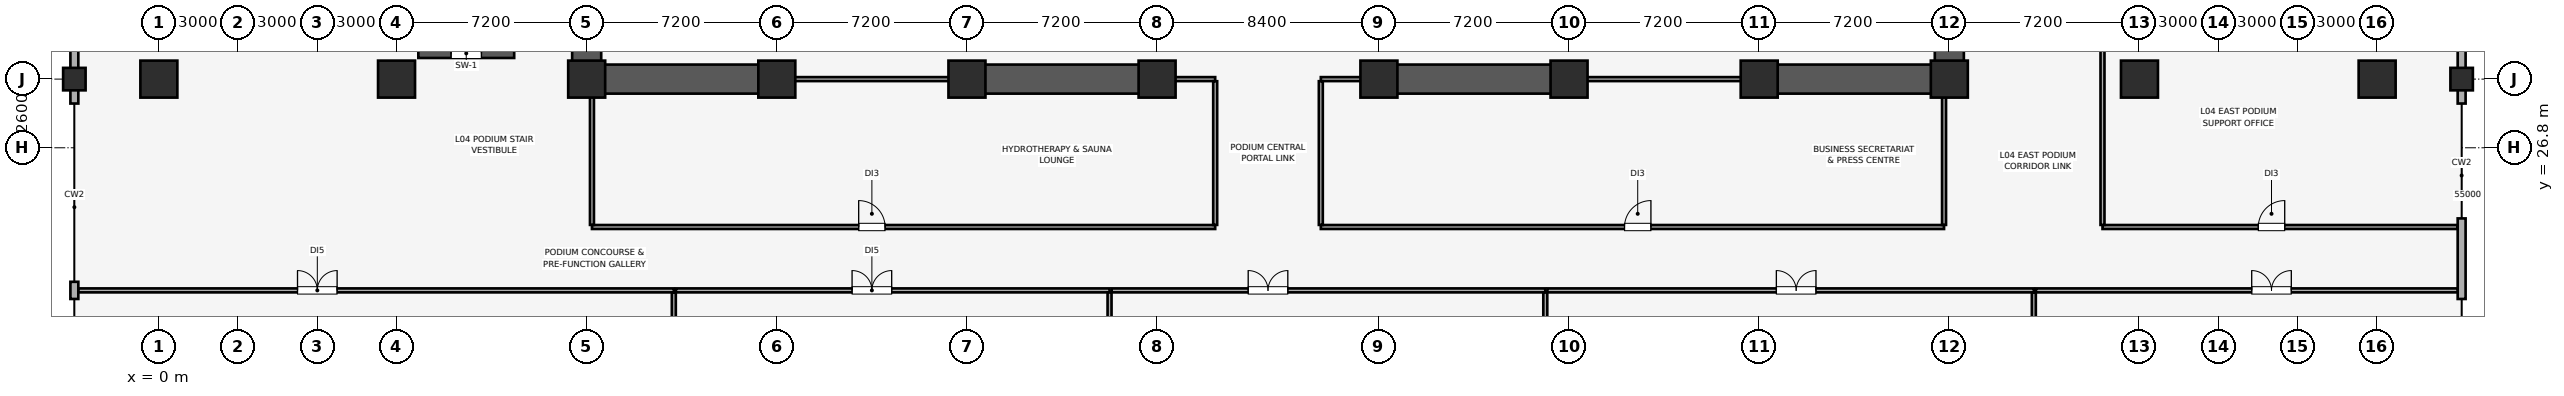
"""IFC4 building model, lengths in metres.
Left out: names, types, materials, properties, quantities, classifications, styles, units other than length and angle.
Written with IfcOpenShell. Run it as: python <this file> out.ifc"""

import sys

from ifc_helpers import new_model, si_unit, direction, frame, frame_2d, origin, origin_2d, place, context, subcontext, project, spatial, rectangle, extrude, element, fill, save


model = new_model("IFC4")
c1 = context("Model", 3, precision=1e-05, world=origin(), true_north=direction((0.0, 1.0)))
c2 = subcontext(c1, "Body", "Model", "MODEL_VIEW")
j1 = project(units=[si_unit("LENGTHUNIT", "METRE"), si_unit("PLANEANGLEUNIT", "RADIAN")], contexts=[c1])
p1 = place(None, origin())
s1 = spatial("IfcSite", under=j1, at=p1, CompositionType="ELEMENT")
p2 = place(p1, origin())
s2 = spatial("IfcBuilding", under=s1, at=p2, CompositionType="ELEMENT")
p3 = place(p2, frame((0.0, 0.0, 26.0)))
s3 = spatial("IfcBuildingStorey", under=s2, at=p3, CompositionType="ELEMENT", Elevation=26.0)
for number, where, z_axis, x_axis in (
    (1, (-3.2, 29.4, 0.0), (0.0, 0.0, 1.0), (1.0, 0.0, 0.0)),
    (2, (87.2, 29.4, 0.0), (0.0, 0.0, 1.0), (1.0, 0.0, 0.0)),
):
    element("IfcColumn", number, at=place(p3, frame(where, z_axis=z_axis, x_axis=x_axis)), inside=s3, PredefinedType="COLUMN", context=c2, shape_type="SweptSolid", body=[
        extrude(rectangle(XDim=0.85, YDim=0.85, at=origin_2d()), origin(), (0.0, 0.0, 1.0), 5.16),
    ])
for number, where, z_axis, x_axis in (
    (3, (9.0, 29.4, 0.0), (0.0, 0.0, 1.0), (1.0, 0.0, 0.0)),
    (4, (16.2, 29.4, 0.0), (0.0, 0.0, 1.0), (1.0, 0.0, 0.0)),
    (5, (23.4, 29.4, 0.0), (0.0, 0.0, 1.0), (1.0, 0.0, 0.0)),
    (6, (30.6, 29.4, 0.0), (0.0, 0.0, 1.0), (1.0, 0.0, 0.0)),
    (7, (37.8, 29.4, 0.0), (0.0, 0.0, 1.0), (1.0, 0.0, 0.0)),
    (8, (46.2, 29.4, 0.0), (0.0, 0.0, 1.0), (1.0, 0.0, 0.0)),
    (9, (53.4, 29.4, 0.0), (0.0, 0.0, 1.0), (1.0, 0.0, 0.0)),
    (10, (60.6, 29.4, 0.0), (0.0, 0.0, 1.0), (1.0, 0.0, 0.0)),
    (11, (67.8, 29.4, 0.0), (0.0, 0.0, 1.0), (1.0, 0.0, 0.0)),
    (12, (75.0, 29.4, 0.0), (0.0, 0.0, 1.0), (1.0, 0.0, 0.0)),
    (13, (0.0, 29.4, 0.0), (0.0, 0.0, 1.0), (1.0, 0.0, 0.0)),
    (14, (84.0, 29.4, 0.0), (0.0, 0.0, 1.0), (1.0, 0.0, 0.0)),
):
    element("IfcColumn", number, at=place(p3, frame(where, z_axis=z_axis, x_axis=x_axis)), inside=s3, PredefinedType="COLUMN", context=c2, shape_type="SweptSolid", body=[
        extrude(rectangle(XDim=1.4, YDim=1.4, at=origin_2d()), origin(), (0.0, 0.0, 1.0), 5.16),
    ])
p4 = place(p3, frame((87.2, 21.075, 0.0), z_axis=(0.0, 0.0, 1.0), x_axis=(0.0, 1.0, 0.0)))
e15 = element("IfcWall", 15, at=p4, inside=s3, PredefinedType="SOLIDWALL", context=c2, shape_type="SweptSolid", body=[
    extrude(rectangle(XDim=3.05, YDim=0.3, at=frame_2d((1.525, 0.0))), origin(), (0.0, 0.0, 1.0), 5.12),
])
p5 = place(p3, frame((87.2, 28.475, 0.0), z_axis=(0.0, 0.0, 1.0), x_axis=(0.0, 1.0, 0.0)))
e16 = element("IfcWall", 16, at=p5, inside=s3, PredefinedType="SOLIDWALL", context=c2, shape_type="SweptSolid", body=[
    extrude(rectangle(XDim=20.425, YDim=0.3, at=frame_2d((10.212, 0.0))), origin(), (0.0, 0.0, 1.0), 5.12),
])
p6 = place(p5, frame((4.525, 0.0, 0.85)))
e17 = element("IfcOpeningElement", 17, at=p6, cuts=e16, PredefinedType="OPENING", context=c2, shape_type="SweptSolid", body=[
    extrude(rectangle(XDim=3.8, YDim=2.2, at=frame_2d((1.9, 1.1))), frame((0.0, 0.16, 0.0), z_axis=(0.0, -1.0, 0.0), x_axis=(1.0, 0.0, 0.0)), (0.0, 0.0, 1.0), 0.32),
])
p7 = place(p5, frame((12.425, 0.0, 0.85)))
e18 = element("IfcOpeningElement", 18, at=p7, cuts=e16, PredefinedType="OPENING", context=c2, shape_type="SweptSolid", body=[
    extrude(rectangle(XDim=3.8, YDim=2.2, at=frame_2d((1.9, 1.1))), frame((0.0, 0.16, 0.0), z_axis=(0.0, -1.0, 0.0), x_axis=(1.0, 0.0, 0.0)), (0.0, 0.0, 1.0), 0.32),
])
p8 = place(p3, frame((-3.2, 48.9, 0.0), z_axis=(0.0, 0.0, 1.0), x_axis=(0.0, -1.0, 0.0)))
e19 = element("IfcWall", 19, at=p8, inside=s3, PredefinedType="SOLIDWALL", context=c2, shape_type="SweptSolid", body=[
    extrude(rectangle(XDim=20.425, YDim=0.3, at=frame_2d((10.212, 0.0))), origin(), (0.0, 0.0, 1.0), 5.12),
])
p9 = place(p8, frame((12.5, 0.0, 0.85)))
e20 = element("IfcOpeningElement", 20, at=p9, cuts=e19, PredefinedType="OPENING", context=c2, shape_type="SweptSolid", body=[
    extrude(rectangle(XDim=3.8, YDim=2.2, at=frame_2d((1.9, 1.1))), frame((0.0, 0.16, 0.0), z_axis=(0.0, -1.0, 0.0), x_axis=(1.0, 0.0, 0.0)), (0.0, 0.0, 1.0), 0.32),
])
p10 = place(p8, frame((4.2, 0.0, 0.85)))
e21 = element("IfcOpeningElement", 21, at=p10, cuts=e19, PredefinedType="OPENING", context=c2, shape_type="SweptSolid", body=[
    extrude(rectangle(XDim=3.8, YDim=2.2, at=frame_2d((1.9, 1.1))), frame((0.0, 0.16, 0.0), z_axis=(0.0, -1.0, 0.0), x_axis=(1.0, 0.0, 0.0)), (0.0, 0.0, 1.0), 0.32),
])
p11 = place(p3, frame((-3.2, 21.725, 0.0), z_axis=(0.0, 0.0, 1.0), x_axis=(0.0, -1.0, 0.0)))
e22 = element("IfcWall", 22, at=p11, inside=s3, PredefinedType="SOLIDWALL", context=c2, shape_type="SweptSolid", body=[
    extrude(rectangle(XDim=0.65, YDim=0.3, at=frame_2d((0.325, 0.0))), origin(), (0.0, 0.0, 1.0), 5.12),
])
for number, where, z_axis, x_axis in (
    (23, (16.2, 29.4, 0.0), (0.0, 0.0, 1.0), (0.0, 1.0, 0.0)),
    (24, (67.8, 29.4, 0.0), (0.0, 0.0, 1.0), (0.0, 1.0, 0.0)),
):
    element("IfcWall", number, at=place(p3, frame(where, z_axis=z_axis, x_axis=x_axis)), inside=s3, PredefinedType="SHEAR", context=c2, shape_type="SweptSolid", body=[
        extrude(rectangle(XDim=19.2, YDim=1.1, at=frame_2d((9.6, 0.0))), origin(), (0.0, 0.0, 1.0), 5.12),
    ])
p12 = place(p3, frame((16.755, 29.4, 0.0), z_axis=(0.0, 0.0, 1.0), x_axis=(1.0, 0.0, 0.0)))
e25 = element("IfcWall", 25, at=p12, inside=s3, PredefinedType="SHEAR", context=c2, shape_type="SweptSolid", body=[
    extrude(rectangle(XDim=6.845, YDim=1.1, at=frame_2d((3.423, 0.0))), origin(), (0.0, 0.0, 1.0), 5.12),
])
for number, where, z_axis, x_axis in (
    (26, (30.4, 29.4, 0.0), (0.0, 0.0, 1.0), (1.0, 0.0, 0.0)),
    (27, (46.0, 29.4, 0.0), (0.0, 0.0, 1.0), (1.0, 0.0, 0.0)),
):
    element("IfcWall", number, at=place(p3, frame(where, z_axis=z_axis, x_axis=x_axis)), inside=s3, PredefinedType="SHEAR", context=c2, shape_type="SweptSolid", body=[
        extrude(rectangle(XDim=7.6, YDim=1.1, at=frame_2d((3.8, 0.0))), origin(), (0.0, 0.0, 1.0), 5.12),
    ])
p13 = place(p3, frame((60.4, 29.4, 0.0), z_axis=(0.0, 0.0, 1.0), x_axis=(1.0, 0.0, 0.0)))
e28 = element("IfcWall", 28, at=p13, inside=s3, PredefinedType="SHEAR", context=c2, shape_type="SweptSolid", body=[
    extrude(rectangle(XDim=6.845, YDim=1.1, at=frame_2d((3.423, 0.0))), origin(), (0.0, 0.0, 1.0), 5.12),
])
p14 = place(p3, frame((9.825, 30.375, 0.0), z_axis=(0.0, 0.0, 1.0), x_axis=(1.0, 0.0, 0.0)))
e29 = element("IfcWall", 29, at=p14, inside=s3, PredefinedType="SHEAR", context=c2, shape_type="SweptSolid", body=[
    extrude(rectangle(XDim=3.63, YDim=0.35, at=frame_2d((1.815, 0.0))), origin(), (0.0, 0.0, 1.0), 5.12),
])
p15 = place(p14, frame((1.24, 0.0, 0.0)))
e30 = element("IfcOpeningElement", 30, at=p15, cuts=e29, PredefinedType="OPENING", context=c2, shape_type="SweptSolid", body=[
    extrude(rectangle(XDim=1.15, YDim=2.15, at=frame_2d((0.575, 1.075))), frame((0.0, 0.185, 0.0), z_axis=(0.0, -1.0, 0.0), x_axis=(1.0, 0.0, 0.0)), (0.0, 0.0, 1.0), 0.37),
])
p16 = place(p3, frame((73.6, 23.8, 0.0), z_axis=(0.0, 0.0, 1.0), x_axis=(1.0, 0.0, 0.0)))
e31 = element("IfcWall", 31, at=p16, inside=s3, PredefinedType="PARTITIONING", context=c2, shape_type="SweptSolid", body=[
    extrude(rectangle(XDim=13.445, YDim=0.15, at=frame_2d((6.722, 0.0))), origin(), (0.0, 0.0, 1.0), 5.12),
])
p17 = place(p16, frame((5.9, 0.0, 0.0)))
e32 = element("IfcOpeningElement", 32, at=p17, cuts=e31, PredefinedType="OPENING", context=c2, shape_type="SweptSolid", body=[
    extrude(rectangle(XDim=1.0, YDim=2.15, at=frame_2d((0.5, 1.075))), frame((0.0, 0.085, 0.0), z_axis=(0.0, -1.0, 0.0), x_axis=(1.0, 0.0, 0.0)), (0.0, 0.0, 1.0), 0.17),
])
p18 = place(p3, frame((73.6, 23.88, 0.0), z_axis=(0.0, 0.0, 1.0), x_axis=(0.0, 1.0, 0.0)))
e33 = element("IfcWall", 33, at=p18, inside=s3, PredefinedType="PARTITIONING", context=c2, shape_type="SweptSolid", body=[
    extrude(rectangle(XDim=6.64, YDim=0.15, at=frame_2d((3.32, 0.0))), origin(), (0.0, 0.0, 1.0), 5.12),
])
p19 = place(p3, frame((-3.045, 21.4, 0.0), z_axis=(0.0, 0.0, 1.0), x_axis=(1.0, 0.0, 0.0)))
e34 = element("IfcWall", 34, at=p19, inside=s3, PredefinedType="PARTITIONING", context=c2, shape_type="SweptSolid", body=[
    extrude(rectangle(XDim=22.545, YDim=0.15, at=frame_2d((11.272, 0.0))), origin(), (0.0, 0.0, 1.0), 5.12),
])
p20 = place(p19, frame((8.295, 0.0, 0.0)))
e35 = element("IfcOpeningElement", 35, at=p20, cuts=e34, PredefinedType="OPENING", context=c2, shape_type="SweptSolid", body=[
    extrude(rectangle(XDim=1.5, YDim=2.25, at=frame_2d((0.75, 1.125))), frame((0.0, 0.085, 0.0), z_axis=(0.0, -1.0, 0.0), x_axis=(1.0, 0.0, 0.0)), (0.0, 0.0, 1.0), 0.17),
])
p21 = place(p3, frame((19.5, -2.345, 0.0), z_axis=(0.0, 0.0, 1.0), x_axis=(0.0, 1.0, 0.0)))
e36 = element("IfcWall", 36, at=p21, inside=s3, PredefinedType="PARTITIONING", context=c2, shape_type="SweptSolid", body=[
    extrude(rectangle(XDim=23.665, YDim=0.15, at=frame_2d((11.833, 0.0))), origin(), (0.0, 0.0, 1.0), 5.12),
])
p22 = place(p3, frame((19.58, 21.4, 0.0), z_axis=(0.0, 0.0, 1.0), x_axis=(1.0, 0.0, 0.0)))
e37 = element("IfcWall", 37, at=p22, inside=s3, PredefinedType="PARTITIONING", context=c2, shape_type="SweptSolid", body=[
    extrude(rectangle(XDim=16.42, YDim=0.15, at=frame_2d((8.21, 0.0))), origin(), (0.0, 0.0, 1.0), 5.12),
])
p23 = place(p22, frame((6.67, 0.0, 0.0)))
e38 = element("IfcOpeningElement", 38, at=p23, cuts=e37, PredefinedType="OPENING", context=c2, shape_type="SweptSolid", body=[
    extrude(rectangle(XDim=1.5, YDim=2.25, at=frame_2d((0.75, 1.125))), frame((0.0, 0.085, 0.0), z_axis=(0.0, -1.0, 0.0), x_axis=(1.0, 0.0, 0.0)), (0.0, 0.0, 1.0), 0.17),
])
p24 = place(p3, frame((36.0, -2.345, 0.0), z_axis=(0.0, 0.0, 1.0), x_axis=(0.0, 1.0, 0.0)))
e39 = element("IfcWall", 39, at=p24, inside=s3, PredefinedType="PARTITIONING", context=c2, shape_type="SweptSolid", body=[
    extrude(rectangle(XDim=23.665, YDim=0.15, at=frame_2d((11.833, 0.0))), origin(), (0.0, 0.0, 1.0), 5.12),
])
p25 = place(p3, frame((36.08, 21.4, 0.0), z_axis=(0.0, 0.0, 1.0), x_axis=(1.0, 0.0, 0.0)))
e40 = element("IfcWall", 40, at=p25, inside=s3, PredefinedType="PARTITIONING", context=c2, shape_type="SweptSolid", body=[
    extrude(rectangle(XDim=16.42, YDim=0.15, at=frame_2d((8.21, 0.0))), origin(), (0.0, 0.0, 1.0), 5.12),
])
p26 = place(p25, frame((5.17, 0.0, 0.0)))
e41 = element("IfcOpeningElement", 41, at=p26, cuts=e40, PredefinedType="OPENING", context=c2, shape_type="SweptSolid", body=[
    extrude(rectangle(XDim=1.5, YDim=2.25, at=frame_2d((0.75, 1.125))), frame((0.0, 0.085, 0.0), z_axis=(0.0, -1.0, 0.0), x_axis=(1.0, 0.0, 0.0)), (0.0, 0.0, 1.0), 0.17),
])
p27 = place(p3, frame((52.5, -2.345, 0.0), z_axis=(0.0, 0.0, 1.0), x_axis=(0.0, 1.0, 0.0)))
e42 = element("IfcWall", 42, at=p27, inside=s3, PredefinedType="PARTITIONING", context=c2, shape_type="SweptSolid", body=[
    extrude(rectangle(XDim=23.665, YDim=0.15, at=frame_2d((11.833, 0.0))), origin(), (0.0, 0.0, 1.0), 5.12),
])
p28 = place(p3, frame((52.58, 21.4, 0.0), z_axis=(0.0, 0.0, 1.0), x_axis=(1.0, 0.0, 0.0)))
e43 = element("IfcWall", 43, at=p28, inside=s3, PredefinedType="PARTITIONING", context=c2, shape_type="SweptSolid", body=[
    extrude(rectangle(XDim=18.42, YDim=0.15, at=frame_2d((9.21, 0.0))), origin(), (0.0, 0.0, 1.0), 5.12),
])
p29 = place(p28, frame((8.67, 0.0, 0.0)))
e44 = element("IfcOpeningElement", 44, at=p29, cuts=e43, PredefinedType="OPENING", context=c2, shape_type="SweptSolid", body=[
    extrude(rectangle(XDim=1.5, YDim=2.25, at=frame_2d((0.75, 1.125))), frame((0.0, 0.085, 0.0), z_axis=(0.0, -1.0, 0.0), x_axis=(1.0, 0.0, 0.0)), (0.0, 0.0, 1.0), 0.17),
])
p30 = place(p3, frame((71.0, -2.345, 0.0), z_axis=(0.0, 0.0, 1.0), x_axis=(0.0, 1.0, 0.0)))
e45 = element("IfcWall", 45, at=p30, inside=s3, PredefinedType="PARTITIONING", context=c2, shape_type="SweptSolid", body=[
    extrude(rectangle(XDim=23.665, YDim=0.15, at=frame_2d((11.833, 0.0))), origin(), (0.0, 0.0, 1.0), 5.12),
])
p31 = place(p3, frame((71.08, 21.4, 0.0), z_axis=(0.0, 0.0, 1.0), x_axis=(1.0, 0.0, 0.0)))
e46 = element("IfcWall", 46, at=p31, inside=s3, PredefinedType="PARTITIONING", context=c2, shape_type="SweptSolid", body=[
    extrude(rectangle(XDim=15.965, YDim=0.15, at=frame_2d((7.982, 0.0))), origin(), (0.0, 0.0, 1.0), 5.12),
])
p32 = place(p31, frame((8.17, 0.0, 0.0)))
e47 = element("IfcOpeningElement", 47, at=p32, cuts=e46, PredefinedType="OPENING", context=c2, shape_type="SweptSolid", body=[
    extrude(rectangle(XDim=1.5, YDim=2.25, at=frame_2d((0.75, 1.125))), frame((0.0, 0.085, 0.0), z_axis=(0.0, -1.0, 0.0), x_axis=(1.0, 0.0, 0.0)), (0.0, 0.0, 1.0), 0.17),
])
p33 = place(p3, frame((16.4, 23.8, 0.0), z_axis=(0.0, 0.0, 1.0), x_axis=(1.0, 0.0, 0.0)))
e48 = element("IfcWall", 48, at=p33, inside=s3, PredefinedType="PARTITIONING", context=c2, shape_type="SweptSolid", body=[
    extrude(rectangle(XDim=23.6, YDim=0.15, at=frame_2d((11.8, 0.0))), origin(), (0.0, 0.0, 1.0), 5.12),
])
p34 = place(p33, frame((10.1, 0.0, 0.0)))
e49 = element("IfcOpeningElement", 49, at=p34, cuts=e48, PredefinedType="OPENING", context=c2, shape_type="SweptSolid", body=[
    extrude(rectangle(XDim=1.0, YDim=2.15, at=frame_2d((0.5, 1.075))), frame((0.0, 0.085, 0.0), z_axis=(0.0, -1.0, 0.0), x_axis=(1.0, 0.0, 0.0)), (0.0, 0.0, 1.0), 0.17),
])
p35 = place(p3, frame((23.61, 29.4, 0.0), z_axis=(0.0, 0.0, 1.0), x_axis=(1.0, 0.0, 0.0)))
e50 = element("IfcWall", 50, at=p35, inside=s3, PredefinedType="PARTITIONING", context=c2, shape_type="SweptSolid", body=[
    extrude(rectangle(XDim=6.78, YDim=0.15, at=frame_2d((3.39, 0.0))), origin(), (0.0, 0.0, 1.0), 4.06),
])
p36 = place(p3, frame((38.01, 29.4, 0.0), z_axis=(0.0, 0.0, 1.0), x_axis=(1.0, 0.0, 0.0)))
e51 = element("IfcWall", 51, at=p36, inside=s3, PredefinedType="PARTITIONING", context=c2, shape_type="SweptSolid", body=[
    extrude(rectangle(XDim=1.99, YDim=0.15, at=frame_2d((0.995, 0.0))), origin(), (0.0, 0.0, 1.0), 4.06),
])
p37 = place(p3, frame((16.4, 23.88, 0.0), z_axis=(0.0, 0.0, 1.0), x_axis=(0.0, 1.0, 0.0)))
e52 = element("IfcWall", 52, at=p37, inside=s3, PredefinedType="PARTITIONING", context=c2, shape_type="SweptSolid", body=[
    extrude(rectangle(XDim=5.51, YDim=0.15, at=frame_2d((2.755, 0.0))), origin(), (0.0, 0.0, 1.0), 4.627),
])
p38 = place(p3, frame((40.0, 23.88, 0.0), z_axis=(0.0, 0.0, 1.0), x_axis=(0.0, 1.0, 0.0)))
e53 = element("IfcWall", 53, at=p38, inside=s3, PredefinedType="PARTITIONING", context=c2, shape_type="SweptSolid", body=[
    extrude(rectangle(XDim=5.44, YDim=0.15, at=frame_2d((2.72, 0.0))), origin(), (0.0, 0.0, 1.0), 5.12),
])
p39 = place(p3, frame((44.0, 23.8, 0.0), z_axis=(0.0, 0.0, 1.0), x_axis=(1.0, 0.0, 0.0)))
e54 = element("IfcWall", 54, at=p39, inside=s3, PredefinedType="PARTITIONING", context=c2, shape_type="SweptSolid", body=[
    extrude(rectangle(XDim=23.6, YDim=0.15, at=frame_2d((11.8, 0.0))), origin(), (0.0, 0.0, 1.0), 5.12),
])
p40 = place(p39, frame((11.5, 0.0, 0.0)))
e55 = element("IfcOpeningElement", 55, at=p40, cuts=e54, PredefinedType="OPENING", context=c2, shape_type="SweptSolid", body=[
    extrude(rectangle(XDim=1.0, YDim=2.15, at=frame_2d((0.5, 1.075))), frame((0.0, 0.085, 0.0), z_axis=(0.0, -1.0, 0.0), x_axis=(1.0, 0.0, 0.0)), (0.0, 0.0, 1.0), 0.17),
])
p41 = place(p3, frame((44.0, 29.4, 0.0), z_axis=(0.0, 0.0, 1.0), x_axis=(1.0, 0.0, 0.0)))
e56 = element("IfcWall", 56, at=p41, inside=s3, PredefinedType="PARTITIONING", context=c2, shape_type="SweptSolid", body=[
    extrude(rectangle(XDim=1.99, YDim=0.15, at=frame_2d((0.995, 0.0))), origin(), (0.0, 0.0, 1.0), 4.06),
])
p42 = place(p3, frame((53.61, 29.4, 0.0), z_axis=(0.0, 0.0, 1.0), x_axis=(1.0, 0.0, 0.0)))
e57 = element("IfcWall", 57, at=p42, inside=s3, PredefinedType="PARTITIONING", context=c2, shape_type="SweptSolid", body=[
    extrude(rectangle(XDim=6.78, YDim=0.15, at=frame_2d((3.39, 0.0))), origin(), (0.0, 0.0, 1.0), 4.06),
])
p43 = place(p3, frame((44.0, 23.88, 0.0), z_axis=(0.0, 0.0, 1.0), x_axis=(0.0, 1.0, 0.0)))
e58 = element("IfcWall", 58, at=p43, inside=s3, PredefinedType="PARTITIONING", context=c2, shape_type="SweptSolid", body=[
    extrude(rectangle(XDim=5.44, YDim=0.15, at=frame_2d((2.72, 0.0))), origin(), (0.0, 0.0, 1.0), 5.12),
])
p44 = place(p3, frame((67.6, 23.88, 0.0), z_axis=(0.0, 0.0, 1.0), x_axis=(0.0, 1.0, 0.0)))
e59 = element("IfcWall", 59, at=p44, inside=s3, PredefinedType="PARTITIONING", context=c2, shape_type="SweptSolid", body=[
    extrude(rectangle(XDim=5.51, YDim=0.15, at=frame_2d((2.755, 0.0))), origin(), (0.0, 0.0, 1.0), 4.627),
])
p45 = place(p15, origin())
e60 = element("IfcDoor", 60, at=p45, inside=s3, OperationType="SINGLE_SWING_RIGHT", PredefinedType="DOOR", context=c2, shape_type="SweptSolid", body=[
    extrude(rectangle(XDim=1.15, YDim=2.15, at=frame_2d((0.575, 1.075))), frame((0.0, 0.025, 0.0), z_axis=(0.0, -1.0, 0.0), x_axis=(1.0, 0.0, 0.0)), (0.0, 0.0, 1.0), 0.05),
])
fill(e30, e60)
p46 = place(p17, origin())
e61 = element("IfcDoor", 61, at=p46, inside=s3, OperationType="SINGLE_SWING_RIGHT", PredefinedType="DOOR", context=c2, shape_type="SweptSolid", body=[
    extrude(rectangle(XDim=1.0, YDim=2.15, at=frame_2d((0.5, 1.075))), frame((0.0, 0.025, 0.0), z_axis=(0.0, -1.0, 0.0), x_axis=(1.0, 0.0, 0.0)), (0.0, 0.0, 1.0), 0.05),
])
fill(e32, e61)
p47 = place(p20, origin())
e62 = element("IfcDoor", 62, at=p47, inside=s3, OperationType="DOUBLE_DOOR_SINGLE_SWING", PredefinedType="DOOR", context=c2, shape_type="SweptSolid", body=[
    extrude(rectangle(XDim=1.5, YDim=2.25, at=frame_2d((0.75, 1.125))), frame((0.0, 0.025, 0.0), z_axis=(0.0, -1.0, 0.0), x_axis=(1.0, 0.0, 0.0)), (0.0, 0.0, 1.0), 0.05),
])
fill(e35, e62)
p48 = place(p23, origin())
e63 = element("IfcDoor", 63, at=p48, inside=s3, OperationType="DOUBLE_DOOR_SINGLE_SWING", PredefinedType="DOOR", context=c2, shape_type="SweptSolid", body=[
    extrude(rectangle(XDim=1.5, YDim=2.25, at=frame_2d((0.75, 1.125))), frame((0.0, 0.025, 0.0), z_axis=(0.0, -1.0, 0.0), x_axis=(1.0, 0.0, 0.0)), (0.0, 0.0, 1.0), 0.05),
])
fill(e38, e63)
p49 = place(p26, origin())
e64 = element("IfcDoor", 64, at=p49, inside=s3, OperationType="DOUBLE_DOOR_SINGLE_SWING", PredefinedType="DOOR", context=c2, shape_type="SweptSolid", body=[
    extrude(rectangle(XDim=1.5, YDim=2.25, at=frame_2d((0.75, 1.125))), frame((0.0, 0.025, 0.0), z_axis=(0.0, -1.0, 0.0), x_axis=(1.0, 0.0, 0.0)), (0.0, 0.0, 1.0), 0.05),
])
fill(e41, e64)
p50 = place(p29, origin())
e65 = element("IfcDoor", 65, at=p50, inside=s3, OperationType="DOUBLE_DOOR_SINGLE_SWING", PredefinedType="DOOR", context=c2, shape_type="SweptSolid", body=[
    extrude(rectangle(XDim=1.5, YDim=2.25, at=frame_2d((0.75, 1.125))), frame((0.0, 0.025, 0.0), z_axis=(0.0, -1.0, 0.0), x_axis=(1.0, 0.0, 0.0)), (0.0, 0.0, 1.0), 0.05),
])
fill(e44, e65)
p51 = place(p32, origin())
e66 = element("IfcDoor", 66, at=p51, inside=s3, OperationType="DOUBLE_DOOR_SINGLE_SWING", PredefinedType="DOOR", context=c2, shape_type="SweptSolid", body=[
    extrude(rectangle(XDim=1.5, YDim=2.25, at=frame_2d((0.75, 1.125))), frame((0.0, 0.025, 0.0), z_axis=(0.0, -1.0, 0.0), x_axis=(1.0, 0.0, 0.0)), (0.0, 0.0, 1.0), 0.05),
])
fill(e47, e66)
p52 = place(p34, origin())
e67 = element("IfcDoor", 67, at=p52, inside=s3, OperationType="SINGLE_SWING_LEFT", PredefinedType="DOOR", context=c2, shape_type="SweptSolid", body=[
    extrude(rectangle(XDim=1.0, YDim=2.15, at=frame_2d((0.5, 1.075))), frame((0.0, 0.025, 0.0), z_axis=(0.0, -1.0, 0.0), x_axis=(1.0, 0.0, 0.0)), (0.0, 0.0, 1.0), 0.05),
])
fill(e49, e67)
p53 = place(p40, origin())
e68 = element("IfcDoor", 68, at=p53, inside=s3, OperationType="SINGLE_SWING_RIGHT", PredefinedType="DOOR", context=c2, shape_type="SweptSolid", body=[
    extrude(rectangle(XDim=1.0, YDim=2.15, at=frame_2d((0.5, 1.075))), frame((0.0, 0.025, 0.0), z_axis=(0.0, -1.0, 0.0), x_axis=(1.0, 0.0, 0.0)), (0.0, 0.0, 1.0), 0.05),
])
fill(e55, e68)
save(model, sys.argv[1])
